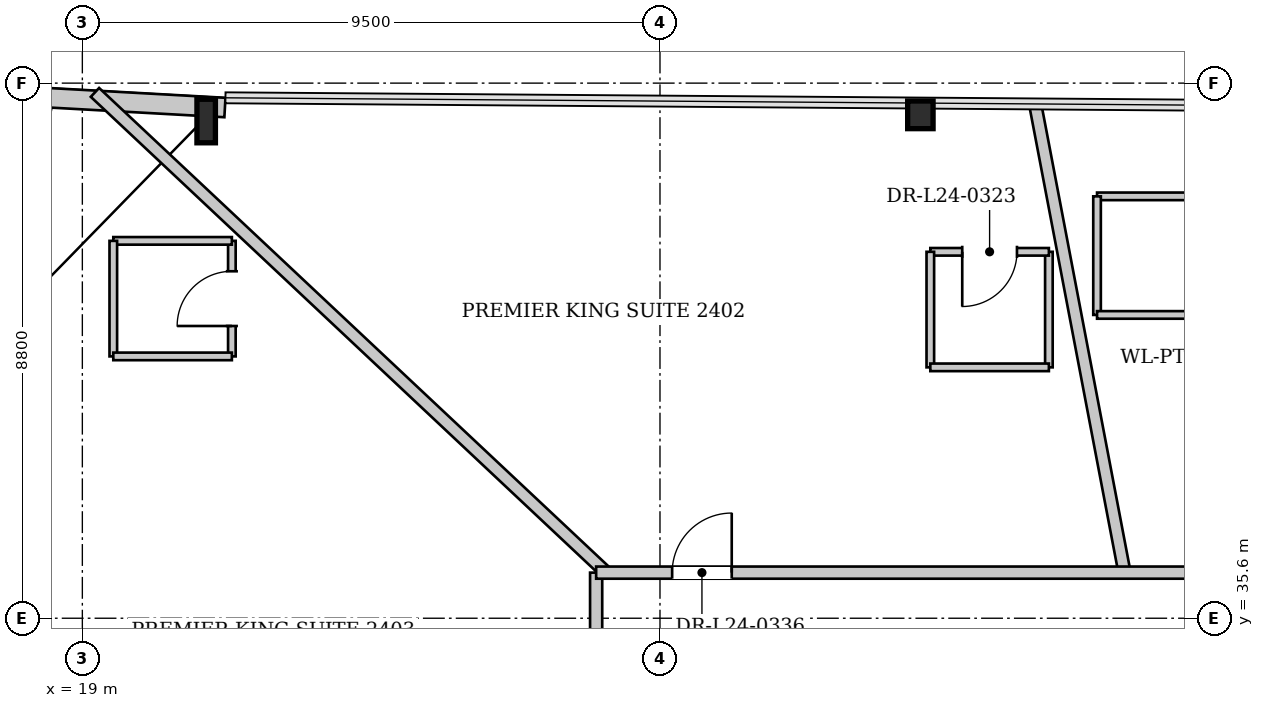
"""IFC4 building model, lengths in metres.
Left out: names, types, materials, properties, quantities, classifications, styles, units other than length and angle.
Written with IfcOpenShell. Run it as: python <this file> out.ifc"""

import sys

from ifc_helpers import new_model, si_unit, direction, frame, frame_2d, origin, origin_2d, place, context, subcontext, project, spatial, rectangle, i_section, extrude, source, transform, mapped, element, fill, save


model = new_model("IFC4")
c1 = context("Model", 3, precision=1e-05, world=origin(), true_north=direction((0.0, 1.0)))
c2 = subcontext(c1, "Body", "Model", "MODEL_VIEW")
j1 = project(units=[si_unit("LENGTHUNIT", "METRE"), si_unit("PLANEANGLEUNIT", "RADIAN")], contexts=[c1])
p1 = place(None, origin())
s1 = spatial("IfcSite", under=j1, at=p1, CompositionType="ELEMENT")
p2 = place(p1, origin())
s2 = spatial("IfcBuilding", under=s1, at=p2, CompositionType="ELEMENT")
p3 = place(p2, frame((0.0, 0.0, 95.05)))
s3 = spatial("IfcBuildingStorey", under=s2, at=p3, CompositionType="ELEMENT", Elevation=95.05)
m1 = source(origin(), c2, "Body", "SweptSolid", [
    extrude(i_section(OverallWidth=0.418, OverallDepth=0.455, WebThickness=0.038, FlangeThickness=0.059, at=origin_2d()), origin(), (0.0, 0.0, 1.0), 3.475),
])
p4 = place(p3, frame((33.125, 44.07, 0.0), z_axis=(-0.197223375333, -0.109958882222, 0.974172461345), x_axis=(0.486963333357, -0.873422413249, 0.0)))
e1 = element("IfcColumn", 1, at=p4, inside=s3, PredefinedType="COLUMN", context=c2, shape_type="MappedRepresentation", body=[
    mapped(m1, transform((0.0, 0.0, 0.0), x_axis=(1.0, 0.0, 0.0), y_axis=(0.0, 1.0, 0.0), z_axis=(0.0, 0.0, 1.0), scale=1.0)),
])
m2 = source(origin(), c2, "Body", "SweptSolid", [
    extrude(i_section(OverallWidth=0.304, OverallDepth=0.716, WebThickness=0.021, FlangeThickness=0.04, at=origin_2d()), origin(), (0.0, 0.0, 1.0), 3.528),
])
p5 = place(p3, frame((21.354, 44.159, 0.0), z_axis=(-0.179800039019, -0.21661821483, 0.959556405311), x_axis=(0.769469151237, -0.638683979206, 0.0)))
e2 = element("IfcColumn", 2, at=p5, inside=s3, PredefinedType="COLUMN", context=c2, shape_type="MappedRepresentation", body=[
    mapped(m2, transform((0.0, 0.0, 0.0), x_axis=(1.0, 0.0, 0.0), y_axis=(0.0, 1.0, 0.0), z_axis=(0.0, 0.0, 1.0), scale=1.0)),
])
p6 = place(p3, frame((17.435, 39.948, 0.0), z_axis=(0.0, 0.0, 1.0), x_axis=(0.215641796387, 0.97647253707, 0.0)))
e3 = element("IfcWall", 3, at=p6, inside=s3, PredefinedType="SOLIDWALL", context=c2, shape_type="SweptSolid", body=[
    extrude(rectangle(XDim=4.454, YDim=0.32, at=frame_2d((2.227, 0.0))), origin(), (0.0, 0.0, 1.0), 2.692),
])
p7 = place(p6, frame((1.477, 0.0, 0.272)))
e4 = element("IfcOpeningElement", 4, at=p7, cuts=e3, PredefinedType="OPENING", context=c2, shape_type="SweptSolid", body=[
    extrude(rectangle(XDim=1.5, YDim=2.3, at=frame_2d((0.75, 1.15))), frame((0.0, 0.17, 0.0), z_axis=(0.0, -1.0, 0.0), x_axis=(1.0, 0.0, 0.0)), (0.0, 0.0, 1.0), 0.34),
])
p8 = place(p3, frame((18.23, 44.172, 0.0), z_axis=(0.0, 0.0, 1.0), x_axis=(0.998463722638, -0.055409336544, 0.0)))
e5 = element("IfcWall", 5, at=p8, inside=s3, PredefinedType="SOLIDWALL", context=c2, shape_type="SweptSolid", body=[
    extrude(rectangle(XDim=3.12, YDim=0.32, at=frame_2d((1.56, 0.0))), origin(), (0.0, 0.0, 1.0), 2.692),
])
p9 = place(p3, frame((36.14, 36.35, 0.0), z_axis=(0.0, 0.0, 1.0), x_axis=(-0.187380505686, 0.982287405034, 0.0)))
e6 = element("IfcWall", 6, at=p9, inside=s3, PredefinedType="PARTITIONING", context=c2, shape_type="SweptSolid", body=[
    extrude(rectangle(XDim=7.816, YDim=0.2, at=frame_2d((3.908, 0.0))), origin(), (0.0, 0.0, 1.0), 3.3),
])
p10 = place(p3, frame((27.617, 36.35, 0.0), z_axis=(0.0, 0.0, 1.0), x_axis=(-0.728967425023, 0.684548386351, 0.0)))
e7 = element("IfcWall", 7, at=p10, inside=s3, PredefinedType="PARTITIONING", context=c2, shape_type="SweptSolid", body=[
    extrude(rectangle(XDim=11.537, YDim=0.2, at=frame_2d((5.769, 0.0))), origin(), (0.0, 0.0, 1.0), 2.795),
])
p11 = place(p3, frame((38.088, 42.538, 0.0), z_axis=(0.0, 0.0, 1.0), x_axis=(-1.0, 0.0, 0.0)))
e8 = element("IfcWall", 8, at=p11, inside=s3, PredefinedType="PARTITIONING", context=c2, shape_type="SweptSolid", body=[
    extrude(rectangle(XDim=2.4, YDim=0.125, at=frame_2d((1.2, 0.0))), origin(), (0.0, 0.0, 1.0), 3.3),
])
p12 = place(p3, frame((35.688, 42.538, 0.0), z_axis=(0.0, 0.0, 1.0), x_axis=(0.0, -1.0, 0.0)))
e9 = element("IfcWall", 9, at=p12, inside=s3, PredefinedType="PARTITIONING", context=c2, shape_type="SweptSolid", body=[
    extrude(rectangle(XDim=1.95, YDim=0.125, at=frame_2d((0.975, 0.0))), origin(), (0.0, 0.0, 1.0), 3.3),
])
p13 = place(p3, frame((35.688, 40.588, 0.0), z_axis=(0.0, 0.0, 1.0), x_axis=(1.0, 0.0, 0.0)))
e10 = element("IfcWall", 10, at=p13, inside=s3, PredefinedType="PARTITIONING", context=c2, shape_type="SweptSolid", body=[
    extrude(rectangle(XDim=2.4, YDim=0.125, at=frame_2d((1.2, 0.0))), origin(), (0.0, 0.0, 1.0), 3.3),
])
p14 = place(p3, frame((34.896, 39.726, 0.0), z_axis=(0.0, 0.0, 1.0), x_axis=(0.0, 1.0, 0.0)))
e11 = element("IfcWall", 11, at=p14, inside=s3, PredefinedType="PARTITIONING", context=c2, shape_type="SweptSolid", body=[
    extrude(rectangle(XDim=1.9, YDim=0.125, at=frame_2d((0.95, 0.0))), origin(), (0.0, 0.0, 1.0), 3.3),
])
p15 = place(p3, frame((34.896, 41.626, 0.0), z_axis=(0.0, 0.0, 1.0), x_axis=(-1.0, 0.0, 0.0)))
e12 = element("IfcWall", 12, at=p15, inside=s3, PredefinedType="PARTITIONING", context=c2, shape_type="SweptSolid", body=[
    extrude(rectangle(XDim=1.95, YDim=0.125, at=frame_2d((0.975, 0.0))), origin(), (0.0, 0.0, 1.0), 3.3),
])
p16 = place(p15, frame((0.525, 0.0, 0.0)))
e13 = element("IfcOpeningElement", 13, at=p16, cuts=e12, PredefinedType="OPENING", context=c2, shape_type="SweptSolid", body=[
    extrude(rectangle(XDim=0.9, YDim=2.1, at=frame_2d((0.45, 1.05))), frame((0.0, 0.073, 0.0), z_axis=(0.0, -1.0, 0.0), x_axis=(1.0, 0.0, 0.0)), (0.0, 0.0, 1.0), 0.145),
])
p17 = place(p3, frame((32.946, 41.626, 0.0), z_axis=(0.0, 0.0, 1.0), x_axis=(0.0, -1.0, 0.0)))
e14 = element("IfcWall", 14, at=p17, inside=s3, PredefinedType="PARTITIONING", context=c2, shape_type="SweptSolid", body=[
    extrude(rectangle(XDim=1.9, YDim=0.125, at=frame_2d((0.95, 0.0))), origin(), (0.0, 0.0, 1.0), 3.3),
])
p18 = place(p3, frame((32.946, 39.726, 0.0), z_axis=(0.0, 0.0, 1.0), x_axis=(1.0, 0.0, 0.0)))
e15 = element("IfcWall", 15, at=p18, inside=s3, PredefinedType="PARTITIONING", context=c2, shape_type="SweptSolid", body=[
    extrude(rectangle(XDim=1.95, YDim=0.125, at=frame_2d((0.975, 0.0))), origin(), (0.0, 0.0, 1.0), 3.3),
])
p19 = place(p3, frame((21.459, 39.906, 0.0), z_axis=(0.0, 0.0, 1.0), x_axis=(0.0, 1.0, 0.0)))
e16 = element("IfcWall", 16, at=p19, inside=s3, PredefinedType="PARTITIONING", context=c2, shape_type="SweptSolid", body=[
    extrude(rectangle(XDim=1.9, YDim=0.125, at=frame_2d((0.95, 0.0))), origin(), (0.0, 0.0, 1.0), 3.3),
])
p20 = place(p19, frame((0.5, 0.0, 0.0)))
e17 = element("IfcOpeningElement", 17, at=p20, cuts=e16, PredefinedType="OPENING", context=c2, shape_type="SweptSolid", body=[
    extrude(rectangle(XDim=0.9, YDim=2.1, at=frame_2d((0.45, 1.05))), frame((0.0, 0.073, 0.0), z_axis=(0.0, -1.0, 0.0), x_axis=(1.0, 0.0, 0.0)), (0.0, 0.0, 1.0), 0.145),
])
p21 = place(p3, frame((21.459, 41.806, 0.0), z_axis=(0.0, 0.0, 1.0), x_axis=(-1.0, 0.0, 0.0)))
e18 = element("IfcWall", 18, at=p21, inside=s3, PredefinedType="PARTITIONING", context=c2, shape_type="SweptSolid", body=[
    extrude(rectangle(XDim=1.95, YDim=0.125, at=frame_2d((0.975, 0.0))), origin(), (0.0, 0.0, 1.0), 3.3),
])
p22 = place(p3, frame((19.509, 41.806, 0.0), z_axis=(0.0, 0.0, 1.0), x_axis=(0.0, -1.0, 0.0)))
e19 = element("IfcWall", 19, at=p22, inside=s3, PredefinedType="PARTITIONING", context=c2, shape_type="SweptSolid", body=[
    extrude(rectangle(XDim=1.9, YDim=0.125, at=frame_2d((0.95, 0.0))), origin(), (0.0, 0.0, 1.0), 3.3),
])
p23 = place(p3, frame((19.509, 39.906, 0.0), z_axis=(0.0, 0.0, 1.0), x_axis=(1.0, 0.0, 0.0)))
e20 = element("IfcWall", 20, at=p23, inside=s3, PredefinedType="PARTITIONING", context=c2, shape_type="SweptSolid", body=[
    extrude(rectangle(XDim=1.95, YDim=0.125, at=frame_2d((0.975, 0.0))), origin(), (0.0, 0.0, 1.0), 3.3),
])
p24 = place(p3, frame((27.45, 16.85, 0.0), z_axis=(0.0, 0.0, 1.0), x_axis=(0.0, 1.0, 0.0)))
e21 = element("IfcWall", 21, at=p24, inside=s3, PredefinedType="PARTITIONING", context=c2, shape_type="SweptSolid", body=[
    extrude(rectangle(XDim=19.5, YDim=0.2, at=frame_2d((9.75, 0.0))), origin(), (0.0, 0.0, 1.0), 3.3),
])
p25 = place(p24, frame((15.435, 0.0, 0.0)))
e22 = element("IfcOpeningElement", 22, at=p25, cuts=e21, PredefinedType="OPENING", context=c2, shape_type="SweptSolid", body=[
    extrude(rectangle(XDim=0.98, YDim=2.15, at=frame_2d((0.49, 1.075))), frame((0.0, 0.11, 0.0), z_axis=(0.0, -1.0, 0.0), x_axis=(1.0, 0.0, 0.0)), (0.0, 0.0, 1.0), 0.22),
])
p26 = place(p24, frame((6.365, 0.0, 0.0)))
e23 = element("IfcOpeningElement", 23, at=p26, cuts=e21, PredefinedType="OPENING", context=c2, shape_type="SweptSolid", body=[
    extrude(rectangle(XDim=0.98, YDim=2.15, at=frame_2d((0.49, 1.075))), frame((0.0, 0.11, 0.0), z_axis=(0.0, -1.0, 0.0), x_axis=(1.0, 0.0, 0.0)), (0.0, 0.0, 1.0), 0.22),
])
p27 = place(p3, frame((27.45, 36.35, 0.0), z_axis=(0.0, 0.0, 1.0), x_axis=(1.0, 0.0, 0.0)))
e24 = element("IfcWall", 24, at=p27, inside=s3, PredefinedType="PARTITIONING", context=c2, shape_type="SweptSolid", body=[
    extrude(rectangle(XDim=21.1, YDim=0.2, at=frame_2d((10.55, 0.0))), origin(), (0.0, 0.0, 1.0), 3.3),
])
p28 = place(p27, frame((11.722, 0.0, 0.0)))
e25 = element("IfcOpeningElement", 25, at=p28, cuts=e24, PredefinedType="OPENING", context=c2, shape_type="SweptSolid", body=[
    extrude(rectangle(XDim=0.98, YDim=2.15, at=frame_2d((0.49, 1.075))), frame((0.0, 0.11, 0.0), z_axis=(0.0, -1.0, 0.0), x_axis=(1.0, 0.0, 0.0)), (0.0, 0.0, 1.0), 0.22),
])
p29 = place(p27, frame((1.25, 0.0, 0.0)))
e26 = element("IfcOpeningElement", 26, at=p29, cuts=e24, PredefinedType="OPENING", context=c2, shape_type="SweptSolid", body=[
    extrude(rectangle(XDim=0.98, YDim=2.15, at=frame_2d((0.49, 1.075))), frame((0.0, 0.11, 0.0), z_axis=(0.0, -1.0, 0.0), x_axis=(1.0, 0.0, 0.0)), (0.0, 0.0, 1.0), 0.22),
])
p30 = place(p27, frame((19.82, 0.0, 0.0)))
e27 = element("IfcOpeningElement", 27, at=p30, cuts=e24, PredefinedType="OPENING", context=c2, shape_type="SweptSolid", body=[
    extrude(rectangle(XDim=0.98, YDim=2.15, at=frame_2d((0.49, 1.075))), frame((0.0, 0.11, 0.0), z_axis=(0.0, -1.0, 0.0), x_axis=(1.0, 0.0, 0.0)), (0.0, 0.0, 1.0), 0.22),
])
m3 = source(origin(), c2, "Body", "SweptSolid", [
    extrude(rectangle(XDim=0.9, YDim=2.1, at=frame_2d((0.45, 1.05))), frame((0.0, 0.025, 0.0), z_axis=(0.0, -1.0, 0.0), x_axis=(1.0, 0.0, 0.0)), (0.0, 0.0, 1.0), 0.05),
])
p31 = place(p16, origin())
e28 = element("IfcDoor", 28, at=p31, inside=s3, OperationType="SINGLE_SWING_RIGHT", PredefinedType="DOOR", context=c2, shape_type="MappedRepresentation", body=[
    mapped(m3, transform((0.0, 0.0, 0.0), x_axis=(1.0, 0.0, 0.0), y_axis=(0.0, 1.0, 0.0), z_axis=(0.0, 0.0, 1.0), scale=1.0)),
])
fill(e13, e28)
p32 = place(p20, origin())
e29 = element("IfcDoor", 29, at=p32, inside=s3, OperationType="SINGLE_SWING_LEFT", PredefinedType="DOOR", context=c2, shape_type="MappedRepresentation", body=[
    mapped(m3, transform((0.0, 0.0, 0.0), x_axis=(1.0, 0.0, 0.0), y_axis=(0.0, 1.0, 0.0), z_axis=(0.0, 0.0, 1.0), scale=1.0)),
])
fill(e17, e29)
m4 = source(origin(), c2, "Body", "SweptSolid", [
    extrude(rectangle(XDim=0.98, YDim=2.15, at=frame_2d((0.49, 1.075))), frame((0.0, 0.025, 0.0), z_axis=(0.0, -1.0, 0.0), x_axis=(1.0, 0.0, 0.0)), (0.0, 0.0, 1.0), 0.05),
])
p33 = place(p29, origin())
e30 = element("IfcDoor", 30, at=p33, inside=s3, OperationType="SINGLE_SWING_RIGHT", PredefinedType="DOOR", context=c2, shape_type="MappedRepresentation", body=[
    mapped(m4, transform((0.0, 0.0, 0.0), x_axis=(1.0, 0.0, 0.0), y_axis=(0.0, 1.0, 0.0), z_axis=(0.0, 0.0, 1.0), scale=1.0)),
])
fill(e26, e30)
save(model, sys.argv[1])
